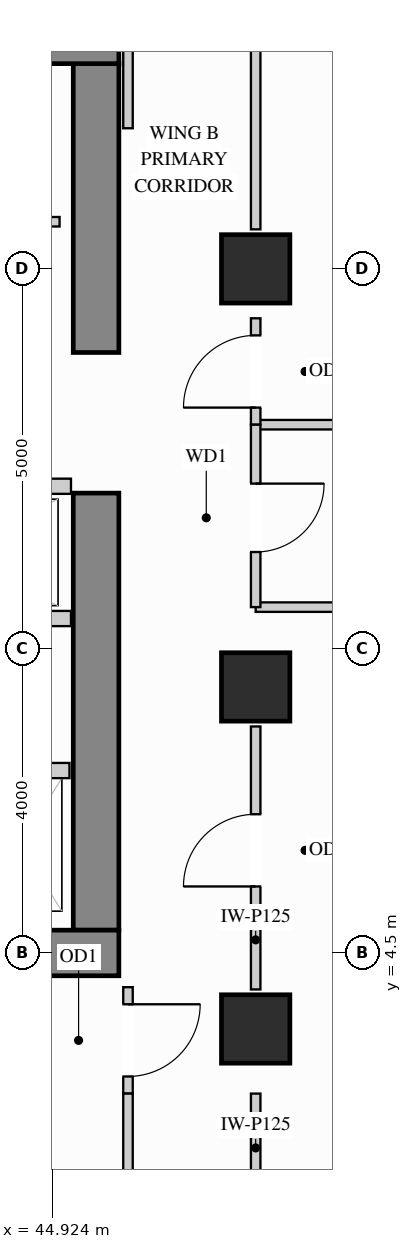
"""IFC4 building model, lengths in metres.
Left out: names, types, materials, properties, quantities, classifications, styles, units other than length and angle.
Written with IfcOpenShell. Run it as: python <this file> out.ifc"""

import sys

from ifc_helpers import new_model, si_unit, direction, frame, frame_2d, origin, origin_2d, place, context, subcontext, project, spatial, rectangle, extrude, source, transform, mapped, element, fill, save


model = new_model("IFC4")
c1 = context("Model", 3, precision=1e-05, world=origin(), true_north=direction((0.0, 1.0)))
c2 = subcontext(c1, "Body", "Model", "MODEL_VIEW")
j1 = project(units=[si_unit("LENGTHUNIT", "METRE"), si_unit("PLANEANGLEUNIT", "RADIAN")], contexts=[c1])
p1 = place(None, origin())
s1 = spatial("IfcSite", under=j1, at=p1, CompositionType="ELEMENT")
p2 = place(p1, origin())
s2 = spatial("IfcBuilding", under=s1, at=p2, CompositionType="ELEMENT")
p3 = place(p2, frame((0.0, 0.0, 164.7)))
s3 = spatial("IfcBuildingStorey", under=s2, at=p3, CompositionType="ELEMENT", Elevation=164.7)
m1 = source(origin(), c2, "Body", "SweptSolid", [
    extrude(rectangle(XDim=0.9, YDim=0.9, at=origin_2d()), origin(), (0.0, 0.0, 1.0), 3.4),
])
for number, where, z_axis, x_axis in (
    (1, (47.6, 13.5, 0.0), (0.0, 0.0, 1.0), (1.0, 0.0, 0.0)),
    (2, (47.6, 3.5, 0.0), (0.0, 0.0, 1.0), (1.0, 0.0, 0.0)),
    (3, (47.6, 8.0, 0.0), (0.0, 0.0, 1.0), (1.0, 0.0, 0.0)),
):
    element("IfcColumn", number, at=place(p3, frame(where, z_axis=z_axis, x_axis=x_axis)), inside=s3, PredefinedType="COLUMN", context=c2, shape_type="MappedRepresentation", body=[
        mapped(m1, transform((0.0, 0.0, 0.0), x_axis=(1.0, 0.0, 0.0), y_axis=(0.0, 1.0, 0.0), z_axis=(0.0, 0.0, 1.0))),
    ])
m2 = source(origin(), c2, "Body", "SweptSolid", [
    extrude(rectangle(XDim=5.75, YDim=0.6, at=frame_2d((2.875, 0.0))), origin(), (0.0, 0.0, 1.0), 3.4),
])
p4 = place(p3, frame((45.5, 4.8, 0.0), z_axis=(0.0, 0.0, 1.0), x_axis=(0.0, 1.0, 0.0)))
e4 = element("IfcWall", 4, at=p4, inside=s3, PredefinedType="SHEAR", context=c2, shape_type="MappedRepresentation", body=[
    mapped(m2, transform((0.0, 0.0, 0.0), x_axis=(1.0, 0.0, 0.0), y_axis=(0.0, 1.0, 0.0), z_axis=(0.0, 0.0, 1.0))),
])
m3 = source(origin(), c2, "Body", "SweptSolid", [
    extrude(rectangle(XDim=3.8, YDim=0.6, at=frame_2d((1.9, 0.0))), origin(), (0.0, 0.0, 1.0), 3.4),
])
p5 = place(p3, frame((45.5, 12.4, 0.0), z_axis=(0.0, 0.0, 1.0), x_axis=(0.0, 1.0, 0.0)))
e5 = element("IfcWall", 5, at=p5, inside=s3, PredefinedType="SHEAR", context=c2, shape_type="MappedRepresentation", body=[
    mapped(m3, transform((0.0, 0.0, 0.0), x_axis=(1.0, 0.0, 0.0), y_axis=(0.0, 1.0, 0.0), z_axis=(0.0, 0.0, 1.0))),
])
m4 = source(origin(), c2, "Body", "SweptSolid", [
    extrude(rectangle(XDim=10.1, YDim=0.6, at=frame_2d((5.05, 0.0))), origin(), (0.0, 0.0, 1.0), 3.4),
])
for number, where, z_axis, x_axis in (
    (6, (35.7, 16.5, 0.0), (0.0, 0.0, 1.0), (1.0, 0.0, 0.0)),
    (7, (35.7, 4.5, 0.0), (0.0, 0.0, 1.0), (1.0, 0.0, 0.0)),
):
    element("IfcWall", number, at=place(p3, frame(where, z_axis=z_axis, x_axis=x_axis)), inside=s3, PredefinedType="SHEAR", context=c2, shape_type="MappedRepresentation", body=[
        mapped(m4, transform((0.0, 0.0, 0.0), x_axis=(1.0, 0.0, 0.0), y_axis=(0.0, 1.0, 0.0), z_axis=(0.0, 0.0, 1.0))),
    ])
p6 = place(p3, frame((41.8, 14.12, 0.0), z_axis=(0.0, 0.0, 1.0), x_axis=(1.0, 0.0, 0.0)))
e8 = element("IfcWall", 8, at=p6, inside=s3, PredefinedType="PARTITIONING", context=c2, shape_type="SweptSolid", body=[
    extrude(rectangle(XDim=3.22, YDim=0.125, at=frame_2d((1.61, 0.0))), origin(), (0.0, 0.0, 1.0), 3.385),
])
p7 = place(p6, frame((1.135, 0.0, 0.0)))
e9 = element("IfcOpeningElement", 9, at=p7, cuts=e8, PredefinedType="OPENING", context=c2, shape_type="SweptSolid", body=[
    extrude(rectangle(XDim=0.85, YDim=2.1, at=frame_2d((0.425, 1.05))), frame((0.0, 0.073, 0.0), z_axis=(0.0, -1.0, 0.0), x_axis=(1.0, 0.0, 0.0)), (0.0, 0.0, 1.0), 0.145),
])
m5 = source(origin(), c2, "Body", "SweptSolid", [
    extrude(rectangle(XDim=5.048, YDim=0.125, at=frame_2d((2.524, 0.0))), origin(), (0.0, 0.0, 1.0), 3.385),
])
for number, where, z_axis, x_axis in (
    (10, (47.6, 11.45, 0.0), (0.0, 0.0, 1.0), (1.0, 0.0, 0.0)),
    (11, (47.6, 9.05, 0.0), (0.0, 0.0, 1.0), (1.0, 0.0, 0.0)),
):
    element("IfcWall", number, at=place(p3, frame(where, z_axis=z_axis, x_axis=x_axis)), inside=s3, PredefinedType="PARTITIONING", context=c2, shape_type="MappedRepresentation", body=[
        mapped(m5, transform((0.0, 0.0, 0.0), x_axis=(1.0, 0.0, 0.0), y_axis=(0.0, 1.0, 0.0), z_axis=(0.0, 0.0, 1.0))),
    ])
p8 = place(p3, frame((47.6, 4.02, 0.0), z_axis=(0.0, 0.0, 1.0), x_axis=(0.0, 1.0, 0.0)))
e12 = element("IfcWall", 12, at=p8, inside=s3, PredefinedType="PARTITIONING", context=c2, shape_type="SweptSolid", body=[
    extrude(rectangle(XDim=3.46, YDim=0.125, at=frame_2d((1.73, 0.0))), origin(), (0.0, 0.0, 1.0), 2.773),
])
p9 = place(p8, frame((1.355, 0.0, 0.0)))
e13 = element("IfcOpeningElement", 13, at=p9, cuts=e12, PredefinedType="OPENING", context=c2, shape_type="SweptSolid", body=[
    extrude(rectangle(XDim=0.95, YDim=2.15, at=frame_2d((0.475, 1.075))), frame((0.0, 0.073, 0.0), z_axis=(0.0, -1.0, 0.0), x_axis=(1.0, 0.0, 0.0)), (0.0, 0.0, 1.0), 0.145),
])
m6 = source(origin(), c2, "Body", "SweptSolid", [
    extrude(rectangle(XDim=1.53, YDim=0.125, at=frame_2d((0.765, 0.0))), origin(), (0.0, 0.0, 1.0), 2.773),
])
p10 = place(p3, frame((47.6, 1.12, 0.0), z_axis=(0.0, 0.0, 1.0), x_axis=(0.0, 1.0, 0.0)))
e14 = element("IfcWall", 14, at=p10, inside=s3, PredefinedType="PARTITIONING", context=c2, shape_type="MappedRepresentation", body=[
    mapped(m6, transform((0.0, 0.0, 0.0), x_axis=(1.0, 0.0, 0.0), y_axis=(0.0, 1.0, 0.0), z_axis=(0.0, 0.0, 1.0))),
])
p11 = place(p3, frame((47.6, 11.45, 0.0), z_axis=(0.0, 0.0, 1.0), x_axis=(0.0, 1.0, 0.0)))
e15 = element("IfcWall", 15, at=p11, inside=s3, PredefinedType="PARTITIONING", context=c2, shape_type="SweptSolid", body=[
    extrude(rectangle(XDim=1.4, YDim=0.125, at=frame_2d((0.7, 0.0))), origin(), (0.0, 0.0, 1.0), 2.773),
])
p12 = place(p11, frame((0.225, 0.0, 0.0)))
e16 = element("IfcOpeningElement", 16, at=p12, cuts=e15, PredefinedType="OPENING", context=c2, shape_type="SweptSolid", body=[
    extrude(rectangle(XDim=0.95, YDim=2.15, at=frame_2d((0.475, 1.075))), frame((0.0, 0.073, 0.0), z_axis=(0.0, -1.0, 0.0), x_axis=(1.0, 0.0, 0.0)), (0.0, 0.0, 1.0), 0.145),
])
m7 = source(origin(), c2, "Body", "SweptSolid", [
    extrude(rectangle(XDim=2.86, YDim=0.125, at=frame_2d((1.43, 0.0))), origin(), (0.0, 0.0, 1.0), 2.773),
])
p13 = place(p3, frame((47.6, 14.02, 0.0), z_axis=(0.0, 0.0, 1.0), x_axis=(0.0, 1.0, 0.0)))
e17 = element("IfcWall", 17, at=p13, inside=s3, PredefinedType="PARTITIONING", context=c2, shape_type="MappedRepresentation", body=[
    mapped(m7, transform((0.0, 0.0, 0.0), x_axis=(1.0, 0.0, 0.0), y_axis=(0.0, 1.0, 0.0), z_axis=(0.0, 0.0, 1.0))),
])
p14 = place(p3, frame((47.6, 9.05, 0.0), z_axis=(0.0, 0.0, 1.0), x_axis=(0.0, 1.0, 0.0)))
e18 = element("IfcWall", 18, at=p14, inside=s3, PredefinedType="PARTITIONING", context=c2, shape_type="SweptSolid", body=[
    extrude(rectangle(XDim=2.4, YDim=0.125, at=frame_2d((1.2, 0.0))), origin(), (0.0, 0.0, 1.0), 2.773),
])
p15 = place(p14, frame((0.725, 0.0, 0.0)))
e19 = element("IfcOpeningElement", 19, at=p15, cuts=e18, PredefinedType="OPENING", context=c2, shape_type="SweptSolid", body=[
    extrude(rectangle(XDim=0.9, YDim=2.15, at=frame_2d((0.45, 1.075))), frame((0.0, 0.073, 0.0), z_axis=(0.0, -1.0, 0.0), x_axis=(1.0, 0.0, 0.0)), (0.0, 0.0, 1.0), 0.145),
])
m8 = source(origin(), c2, "Body", "SweptSolid", [
    extrude(rectangle(XDim=2.298, YDim=0.125, at=frame_2d((1.149, 0.0))), origin(), (0.0, 0.0, 1.0), 3.385),
])
p16 = place(p3, frame((45.92, 15.35, 0.0), z_axis=(0.0, 0.0, 1.0), x_axis=(0.0, 1.0, 0.0)))
e20 = element("IfcWall", 20, at=p16, inside=s3, PredefinedType="PARTITIONING", context=c2, shape_type="MappedRepresentation", body=[
    mapped(m8, transform((0.0, 0.0, 0.0), x_axis=(1.0, 0.0, 0.0), y_axis=(0.0, 1.0, 0.0), z_axis=(0.0, 0.0, 1.0))),
])
p17 = place(p3, frame((45.92, 2.65, 0.0), z_axis=(0.0, 0.0, 1.0), x_axis=(0.0, 1.0, 0.0)))
e21 = element("IfcWall", 21, at=p17, inside=s3, PredefinedType="PARTITIONING", context=c2, shape_type="SweptSolid", body=[
    extrude(rectangle(XDim=1.4, YDim=0.125, at=frame_2d((0.7, 0.0))), origin(), (0.0, 0.0, 1.0), 3.385),
])
p18 = place(p17, frame((0.225, 0.0, 0.0)))
e22 = element("IfcOpeningElement", 22, at=p18, cuts=e21, PredefinedType="OPENING", context=c2, shape_type="SweptSolid", body=[
    extrude(rectangle(XDim=0.95, YDim=2.15, at=frame_2d((0.475, 1.075))), frame((0.0, 0.073, 0.0), z_axis=(0.0, -1.0, 0.0), x_axis=(1.0, 0.0, 0.0)), (0.0, 0.0, 1.0), 0.145),
])
p19 = place(p3, frame((45.92, 0.352, 0.0), z_axis=(0.0, 0.0, 1.0), x_axis=(0.0, 1.0, 0.0)))
e23 = element("IfcWall", 23, at=p19, inside=s3, PredefinedType="PARTITIONING", context=c2, shape_type="MappedRepresentation", body=[
    mapped(m8, transform((0.0, 0.0, 0.0), x_axis=(1.0, 0.0, 0.0), y_axis=(0.0, 1.0, 0.0), z_axis=(0.0, 0.0, 1.0))),
])
m9 = source(origin(), c2, "Body", "SweptSolid", [
    extrude(rectangle(XDim=1.3, YDim=0.2, at=frame_2d((0.65, 0.0))), origin(), (0.0, 0.0, 1.0), 3.385),
])
p20 = place(p3, frame((43.85, 6.9, 0.0), z_axis=(0.0, 0.0, 1.0), x_axis=(1.0, 0.0, 0.0)))
e24 = element("IfcWall", 24, at=p20, inside=s3, PredefinedType="PARTITIONING", context=c2, shape_type="MappedRepresentation", body=[
    mapped(m9, transform((0.0, 0.0, 0.0), x_axis=(1.0, 0.0, 0.0), y_axis=(0.0, 1.0, 0.0), z_axis=(0.0, 0.0, 1.0))),
])
m10 = source(origin(), c2, "Body", "SweptSolid", [
    extrude(rectangle(XDim=3.49, YDim=0.2, at=frame_2d((1.745, 0.0))), origin(), (0.0, 0.0, 1.0), 3.385),
])
for number, where, z_axis, x_axis in (
    (25, (41.68, 10.64, 0.0), (0.0, 0.0, 1.0), (1.0, 0.0, 0.0)),
    (26, (41.68, 8.9, 0.0), (0.0, 0.0, 1.0), (1.0, 0.0, 0.0)),
):
    element("IfcWall", number, at=place(p3, frame(where, z_axis=z_axis, x_axis=x_axis)), inside=s3, PredefinedType="PARTITIONING", context=c2, shape_type="MappedRepresentation", body=[
        mapped(m10, transform((0.0, 0.0, 0.0), x_axis=(1.0, 0.0, 0.0), y_axis=(0.0, 1.0, 0.0), z_axis=(0.0, 0.0, 1.0))),
    ])
m11 = source(origin(), c2, "Body", "SweptSolid", [
    extrude(rectangle(XDim=0.95, YDim=2.15, at=frame_2d((0.475, 1.075))), frame((0.0, 0.025, 0.0), z_axis=(0.0, -1.0, 0.0), x_axis=(1.0, 0.0, 0.0)), (0.0, 0.0, 1.0), 0.05),
])
p21 = place(p18, origin())
e27 = element("IfcDoor", 27, at=p21, inside=s3, OperationType="SINGLE_SWING_RIGHT", PredefinedType="DOOR", context=c2, shape_type="MappedRepresentation", body=[
    mapped(m11, transform((0.0, 0.0, 0.0), x_axis=(1.0, 0.0, 0.0), y_axis=(0.0, 1.0, 0.0), z_axis=(0.0, 0.0, 1.0))),
])
fill(e22, e27)
p22 = place(p9, origin())
e28 = element("IfcDoor", 28, at=p22, inside=s3, OperationType="SINGLE_SWING_LEFT", PredefinedType="DOOR", context=c2, shape_type="MappedRepresentation", body=[
    mapped(m11, transform((0.0, 0.0, 0.0), x_axis=(1.0, 0.0, 0.0), y_axis=(0.0, 1.0, 0.0), z_axis=(0.0, 0.0, 1.0))),
])
fill(e13, e28)
p23 = place(p12, origin())
e29 = element("IfcDoor", 29, at=p23, inside=s3, OperationType="SINGLE_SWING_LEFT", PredefinedType="DOOR", context=c2, shape_type="MappedRepresentation", body=[
    mapped(m11, transform((0.0, 0.0, 0.0), x_axis=(1.0, 0.0, 0.0), y_axis=(0.0, 1.0, 0.0), z_axis=(0.0, 0.0, 1.0))),
])
fill(e16, e29)
m12 = source(origin(), c2, "Body", "SweptSolid", [
    extrude(rectangle(XDim=0.9, YDim=2.15, at=frame_2d((0.45, 1.075))), frame((0.0, 0.025, 0.0), z_axis=(0.0, -1.0, 0.0), x_axis=(1.0, 0.0, 0.0)), (0.0, 0.0, 1.0), 0.05),
])
p24 = place(p15, origin())
e30 = element("IfcDoor", 30, at=p24, inside=s3, OperationType="SINGLE_SWING_RIGHT", PredefinedType="DOOR", context=c2, shape_type="MappedRepresentation", body=[
    mapped(m12, transform((0.0, 0.0, 0.0), x_axis=(1.0, 0.0, 0.0), y_axis=(0.0, 1.0, 0.0), z_axis=(0.0, 0.0, 1.0))),
])
fill(e19, e30)
save(model, sys.argv[1])
